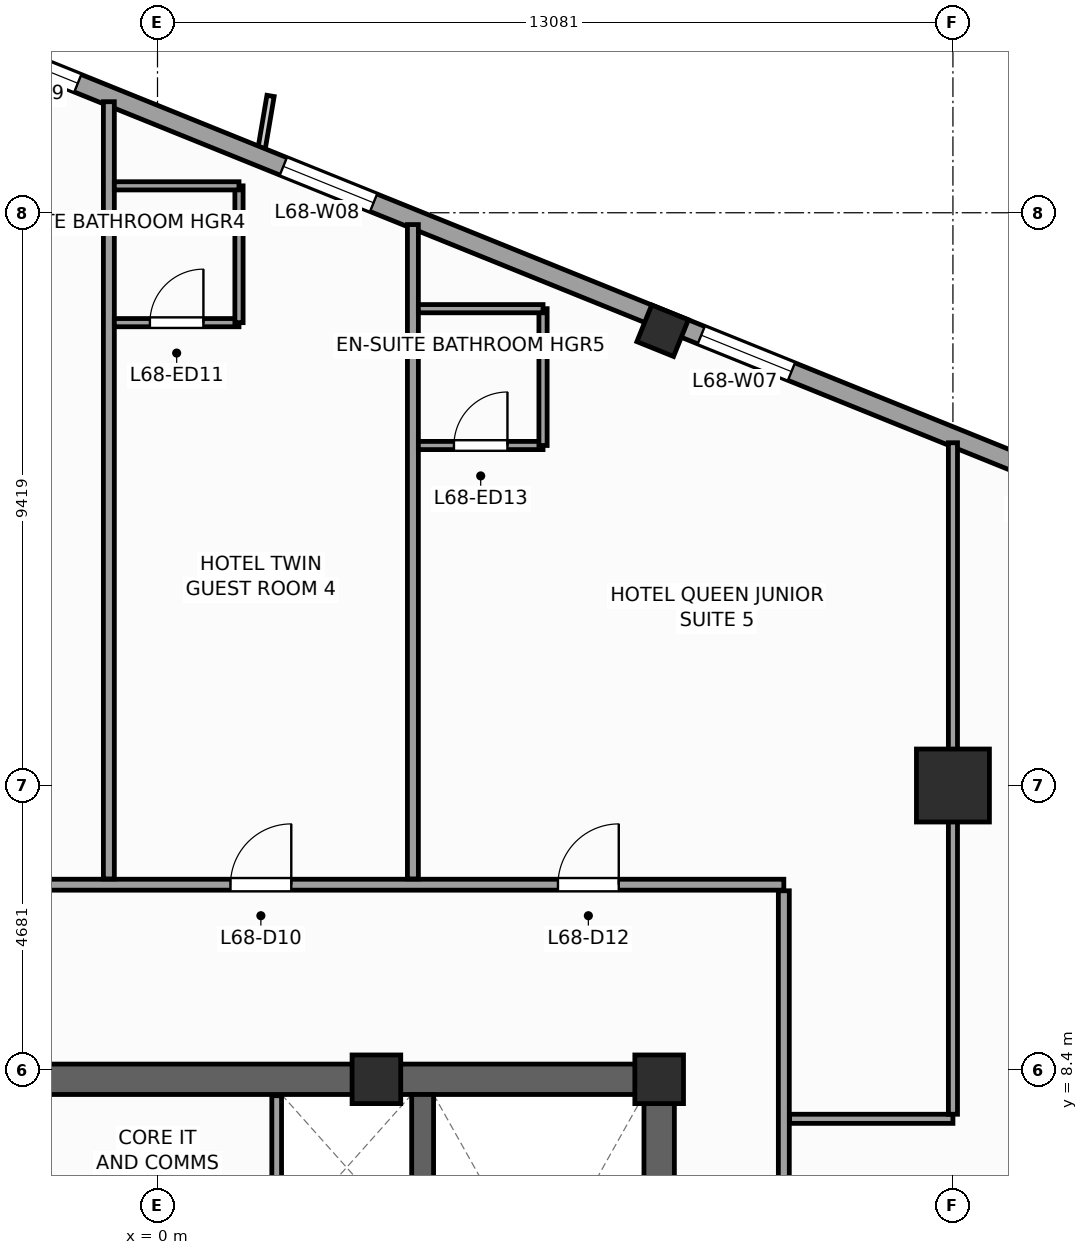
"""IFC4 building model, lengths in metres.
Left out: names, types, materials, properties, quantities, classifications, styles, units other than length and angle.
Written with IfcOpenShell. Run it as: python <this file> out.ifc"""

import sys

from ifc_helpers import new_model, si_unit, direction, frame, frame_2d, origin, origin_2d, place, context, subcontext, project, spatial, rectangle, extrude, source, transform, mapped, element, fill, save


model = new_model("IFC4")
c1 = context("Model", 3, precision=1e-05, world=origin(), true_north=direction((0.0, 1.0)))
c2 = subcontext(c1, "Body", "Model", "MODEL_VIEW")
j1 = project(units=[si_unit("LENGTHUNIT", "METRE"), si_unit("PLANEANGLEUNIT", "RADIAN")], contexts=[c1])
p1 = place(None, origin())
s1 = spatial("IfcSite", under=j1, at=p1, CompositionType="ELEMENT")
p2 = place(p1, origin())
s2 = spatial("IfcBuilding", under=s1, at=p2, CompositionType="ELEMENT")
p3 = place(p2, frame((0.0, 0.0, 279.6)))
s3 = spatial("IfcBuildingStorey", under=s2, at=p3, CompositionType="ELEMENT", Elevation=279.6)
p4 = place(p3, frame((-8.5, 8.25, 0.0), z_axis=(0.0, 0.0, 1.0), x_axis=(1.0, 0.0, 0.0)))
e1 = element("IfcWall", 1, at=p4, inside=s3, PredefinedType="SHEAR", context=c2, shape_type="SweptSolid", body=[
    extrude(rectangle(XDim=17.0, YDim=0.5, at=frame_2d((8.5, 0.0))), origin(), (0.0, 0.0, 1.0), 3.6),
])
p5 = place(p3, frame((8.25, -8.0, 0.0), z_axis=(0.0, 0.0, 1.0), x_axis=(0.0, 1.0, 0.0)))
e2 = element("IfcWall", 2, at=p5, inside=s3, PredefinedType="SHEAR", context=c2, shape_type="SweptSolid", body=[
    extrude(rectangle(XDim=16.0, YDim=0.5, at=frame_2d((8.0, 0.0))), origin(), (0.0, 0.0, 1.0), 3.6),
])
p6 = place(p5, frame((4.69, 0.0, 0.0)))
e3 = element("IfcOpeningElement", 3, at=p6, cuts=e2, PredefinedType="OPENING", context=c2, shape_type="SweptSolid", body=[
    extrude(rectangle(XDim=1.3, YDim=2.2, at=frame_2d((0.65, 1.1))), frame((0.0, 0.26, 0.0), z_axis=(0.0, -1.0, 0.0), x_axis=(1.0, 0.0, 0.0)), (0.0, 0.0, 1.0), 0.52),
])
p7 = place(p3, frame((4.36, -8.0, 0.0), z_axis=(0.0, 0.0, 1.0), x_axis=(0.0, 1.0, 0.0)))
e4 = element("IfcWall", 4, at=p7, inside=s3, PredefinedType="SHEAR", context=c2, shape_type="SweptSolid", body=[
    extrude(rectangle(XDim=16.0, YDim=0.36, at=frame_2d((8.0, 0.0))), origin(), (0.0, 0.0, 1.0), 3.6),
])
m1 = source(origin(), c2, "Body", "SweptSolid", [
    extrude(rectangle(XDim=0.8, YDim=0.8, at=origin_2d()), origin(), (0.0, 0.0, 1.0), 3.6),
])
for number, where, z_axis, x_axis in (
    (5, (8.25, 8.25, 0.0), (0.0, 0.0, 1.0), (1.0, 0.0, 0.0)),
    (6, (3.6, 8.25, 0.0), (0.0, 0.0, 1.0), (1.0, 0.0, 0.0)),
):
    element("IfcColumn", number, at=place(p3, frame(where, z_axis=z_axis, x_axis=x_axis)), inside=s3, PredefinedType="PILASTER", context=c2, shape_type="MappedRepresentation", body=[
        mapped(m1, transform((0.0, 0.0, 0.0), scale=1.0)),
    ])
m2 = source(origin(), c2, "Body", "SweptSolid", [
    extrude(rectangle(XDim=1.2, YDim=1.2, at=origin_2d()), origin(), (0.0, 0.0, 1.0), 3.6),
])
p8 = place(p3, frame((13.081, 13.081, 0.0), z_axis=(0.0, 0.0, 1.0), x_axis=(1.0, 0.0, 0.0)))
e7 = element("IfcColumn", 7, at=p8, inside=s3, PredefinedType="COLUMN", context=c2, shape_type="MappedRepresentation", body=[
    mapped(m2, transform((0.0, 0.0, 0.0), scale=1.0)),
])
m3 = source(origin(), c2, "Body", "SweptSolid", [
    extrude(rectangle(XDim=0.65, YDim=0.65, at=origin_2d()), origin(), (0.0, 0.0, 1.0), 3.6),
])
p9 = place(p3, frame((8.307, 20.56, 0.0), z_axis=(0.0, 0.0, 1.0), x_axis=(0.374606593416, 0.927183854567, 0.0)))
e8 = element("IfcColumn", 8, at=p9, inside=s3, PredefinedType="COLUMN", context=c2, shape_type="MappedRepresentation", body=[
    mapped(m3, transform((0.0, 0.0, 0.0), scale=1.0)),
])
p10 = place(p3, frame((23.813, 14.479, 0.0), z_axis=(0.0, 0.0, 1.0), x_axis=(-0.927182657188, 0.374609557019, 0.0)))
e9 = element("IfcWall", 9, at=p10, inside=s3, PredefinedType="STANDARD", context=c2, shape_type="SweptSolid", body=[
    extrude(rectangle(XDim=33.31, YDim=0.31, at=frame_2d((16.655, 0.0))), origin(), (0.0, 0.0, 1.0), 2.75),
])
p11 = place(p10, frame((3.197, 0.0, 0.47)))
e10 = element("IfcOpeningElement", 10, at=p11, cuts=e9, PredefinedType="OPENING", context=c2, shape_type="SweptSolid", body=[
    extrude(rectangle(XDim=1.6, YDim=2.1, at=frame_2d((0.8, 1.05))), frame((0.0, 0.165, 0.0), z_axis=(0.0, -1.0, 0.0), x_axis=(1.0, 0.0, 0.0)), (0.0, 0.0, 1.0), 0.33),
])
p12 = place(p10, frame((8.86, 0.0, 0.47)))
e11 = element("IfcOpeningElement", 11, at=p12, cuts=e9, PredefinedType="OPENING", context=c2, shape_type="SweptSolid", body=[
    extrude(rectangle(XDim=1.6, YDim=2.1, at=frame_2d((0.8, 1.05))), frame((0.0, 0.165, 0.0), z_axis=(0.0, -1.0, 0.0), x_axis=(1.0, 0.0, 0.0)), (0.0, 0.0, 1.0), 0.33),
])
p13 = place(p10, frame((14.439, 0.0, 0.47)))
e12 = element("IfcOpeningElement", 12, at=p13, cuts=e9, PredefinedType="OPENING", context=c2, shape_type="SweptSolid", body=[
    extrude(rectangle(XDim=1.6, YDim=2.1, at=frame_2d((0.8, 1.05))), frame((0.0, 0.165, 0.0), z_axis=(0.0, -1.0, 0.0), x_axis=(1.0, 0.0, 0.0)), (0.0, 0.0, 1.0), 0.33),
])
p14 = place(p10, frame((21.851, 0.0, 0.47)))
e13 = element("IfcOpeningElement", 13, at=p14, cuts=e9, PredefinedType="OPENING", context=c2, shape_type="SweptSolid", body=[
    extrude(rectangle(XDim=1.6, YDim=2.1, at=frame_2d((0.8, 1.05))), frame((0.0, 0.165, 0.0), z_axis=(0.0, -1.0, 0.0), x_axis=(1.0, 0.0, 0.0)), (0.0, 0.0, 1.0), 0.33),
])
p15 = place(p10, frame((27.097, 0.0, 0.47)))
e14 = element("IfcOpeningElement", 14, at=p15, cuts=e9, PredefinedType="OPENING", context=c2, shape_type="SweptSolid", body=[
    extrude(rectangle(XDim=1.6, YDim=2.1, at=frame_2d((0.8, 1.05))), frame((0.0, 0.165, 0.0), z_axis=(0.0, -1.0, 0.0), x_axis=(1.0, 0.0, 0.0)), (0.0, 0.0, 1.0), 0.33),
])
p16 = place(p3, frame((1.96, 4.58, 0.0), z_axis=(0.0, 0.0, 1.0), x_axis=(0.0, 1.0, 0.0)))
e15 = element("IfcWall", 15, at=p16, inside=s3, PredefinedType="PARTITIONING", context=c2, shape_type="SweptSolid", body=[
    extrude(rectangle(XDim=3.4, YDim=0.16, at=frame_2d((1.7, 0.0))), origin(), (0.0, 0.0, 1.0), 3.35),
])
p17 = place(p3, frame((-11.45, 11.45, 0.0), z_axis=(0.0, 0.0, 1.0), x_axis=(1.0, 0.0, 0.0)))
e16 = element("IfcWall", 16, at=p17, inside=s3, PredefinedType="PARTITIONING", context=c2, shape_type="SweptSolid", body=[
    extrude(rectangle(XDim=21.75, YDim=0.18, at=frame_2d((10.875, 0.0))), origin(), (0.0, 0.0, 1.0), 3.35),
])
p18 = place(p17, frame((2.639, 0.0, 0.0)))
e17 = element("IfcOpeningElement", 17, at=p18, cuts=e16, PredefinedType="OPENING", context=c2, shape_type="SweptSolid", body=[
    extrude(rectangle(XDim=1.0, YDim=2.15, at=frame_2d((0.5, 1.075))), frame((0.0, 0.1, 0.0), z_axis=(0.0, -1.0, 0.0), x_axis=(1.0, 0.0, 0.0)), (0.0, 0.0, 1.0), 0.2),
])
p19 = place(p17, frame((7.8, 0.0, 0.0)))
e18 = element("IfcOpeningElement", 18, at=p19, cuts=e16, PredefinedType="OPENING", context=c2, shape_type="SweptSolid", body=[
    extrude(rectangle(XDim=1.0, YDim=2.15, at=frame_2d((0.5, 1.075))), frame((0.0, 0.1, 0.0), z_axis=(0.0, -1.0, 0.0), x_axis=(1.0, 0.0, 0.0)), (0.0, 0.0, 1.0), 0.2),
])
p20 = place(p17, frame((12.65, 0.0, 0.0)))
e19 = element("IfcOpeningElement", 19, at=p20, cuts=e16, PredefinedType="OPENING", context=c2, shape_type="SweptSolid", body=[
    extrude(rectangle(XDim=1.0, YDim=2.15, at=frame_2d((0.5, 1.075))), frame((0.0, 0.1, 0.0), z_axis=(0.0, -1.0, 0.0), x_axis=(1.0, 0.0, 0.0)), (0.0, 0.0, 1.0), 0.2),
])
p21 = place(p17, frame((18.036, 0.0, 0.0)))
e20 = element("IfcOpeningElement", 20, at=p21, cuts=e16, PredefinedType="OPENING", context=c2, shape_type="SweptSolid", body=[
    extrude(rectangle(XDim=1.0, YDim=2.15, at=frame_2d((0.5, 1.075))), frame((0.0, 0.1, 0.0), z_axis=(0.0, -1.0, 0.0), x_axis=(1.0, 0.0, 0.0)), (0.0, 0.0, 1.0), 0.2),
])
p22 = place(p3, frame((10.3, -12.35, 0.0), z_axis=(0.0, 0.0, 1.0), x_axis=(0.0, 1.0, 0.0)))
e21 = element("IfcWall", 21, at=p22, inside=s3, PredefinedType="PARTITIONING", context=c2, shape_type="SweptSolid", body=[
    extrude(rectangle(XDim=23.7, YDim=0.18, at=frame_2d((11.85, 0.0))), origin(), (0.0, 0.0, 1.0), 3.35),
])
p23 = place(p22, frame((17.65, 0.0, 0.0)))
e22 = element("IfcOpeningElement", 22, at=p23, cuts=e21, PredefinedType="OPENING", context=c2, shape_type="SweptSolid", body=[
    extrude(rectangle(XDim=1.0, YDim=2.15, at=frame_2d((0.5, 1.075))), frame((0.0, 0.1, 0.0), z_axis=(0.0, -1.0, 0.0), x_axis=(1.0, 0.0, 0.0)), (0.0, 0.0, 1.0), 0.2),
])
p24 = place(p22, frame((13.85, 0.0, 0.0)))
e23 = element("IfcOpeningElement", 23, at=p24, cuts=e21, PredefinedType="OPENING", context=c2, shape_type="SweptSolid", body=[
    extrude(rectangle(XDim=1.0, YDim=2.15, at=frame_2d((0.5, 1.075))), frame((0.0, 0.1, 0.0), z_axis=(0.0, -1.0, 0.0), x_axis=(1.0, 0.0, 0.0)), (0.0, 0.0, 1.0), 0.2),
])
p25 = place(p22, frame((9.85, 0.0, 0.0)))
e24 = element("IfcOpeningElement", 24, at=p25, cuts=e21, PredefinedType="OPENING", context=c2, shape_type="SweptSolid", body=[
    extrude(rectangle(XDim=1.0, YDim=2.15, at=frame_2d((0.5, 1.075))), frame((0.0, 0.1, 0.0), z_axis=(0.0, -1.0, 0.0), x_axis=(1.0, 0.0, 0.0)), (0.0, 0.0, 1.0), 0.2),
])
p26 = place(p22, frame((6.05, 0.0, 0.0)))
e25 = element("IfcOpeningElement", 25, at=p26, cuts=e21, PredefinedType="OPENING", context=c2, shape_type="SweptSolid", body=[
    extrude(rectangle(XDim=1.0, YDim=2.15, at=frame_2d((0.5, 1.075))), frame((0.0, 0.1, 0.0), z_axis=(0.0, -1.0, 0.0), x_axis=(1.0, 0.0, 0.0)), (0.0, 0.0, 1.0), 0.2),
])
p27 = place(p3, frame((-0.8, 11.545, 0.0), z_axis=(0.0, 0.0, 1.0), x_axis=(0.0, 1.0, 0.0)))
e26 = element("IfcWall", 26, at=p27, inside=s3, PredefinedType="PARTITIONING", context=c2, shape_type="SweptSolid", body=[
    extrude(rectangle(XDim=12.781, YDim=0.18, at=frame_2d((6.391, 0.0))), origin(), (0.0, 0.0, 1.0), 3.35),
])
p28 = place(p3, frame((4.2, 11.545, 0.0), z_axis=(0.0, 0.0, 1.0), x_axis=(0.0, 1.0, 0.0)))
e27 = element("IfcWall", 27, at=p28, inside=s3, PredefinedType="PARTITIONING", context=c2, shape_type="SweptSolid", body=[
    extrude(rectangle(XDim=10.761, YDim=0.18, at=frame_2d((5.38, 0.0))), origin(), (0.0, 0.0, 1.0), 3.35),
])
p29 = place(p3, frame((10.395, 7.6, 0.0), z_axis=(0.0, 0.0, 1.0), x_axis=(1.0, 0.0, 0.0)))
e28 = element("IfcWall", 28, at=p29, inside=s3, PredefinedType="PARTITIONING", context=c2, shape_type="SweptSolid", body=[
    extrude(rectangle(XDim=2.686, YDim=0.15, at=frame_2d((1.343, 0.0))), origin(), (0.0, 0.0, 1.0), 3.35),
])
p30 = place(p3, frame((13.081, 7.675, 0.0), z_axis=(0.0, 0.0, 1.0), x_axis=(0.0, 1.0, 0.0)))
e29 = element("IfcWall", 29, at=p30, inside=s3, PredefinedType="PARTITIONING", context=c2, shape_type="SweptSolid", body=[
    extrude(rectangle(XDim=11.043, YDim=0.15, at=frame_2d((5.521, 0.0))), origin(), (0.0, 0.0, 1.0), 2.45),
])
p31 = place(p3, frame((-0.71, 20.693, 0.0), z_axis=(0.0, 0.0, 1.0), x_axis=(1.0, 0.0, 0.0)))
e30 = element("IfcWall", 30, at=p31, inside=s3, PredefinedType="PARTITIONING", context=c2, shape_type="SweptSolid", body=[
    extrude(rectangle(XDim=2.05, YDim=0.135, at=frame_2d((1.025, 0.0))), origin(), (0.0, 0.0, 1.0), 3.35),
])
p32 = place(p31, frame((0.585, 0.0, 0.0)))
e31 = element("IfcOpeningElement", 31, at=p32, cuts=e30, PredefinedType="OPENING", context=c2, shape_type="SweptSolid", body=[
    extrude(rectangle(XDim=0.88, YDim=2.1, at=frame_2d((0.44, 1.05))), frame((0.0, 0.078, 0.0), z_axis=(0.0, -1.0, 0.0), x_axis=(1.0, 0.0, 0.0)), (0.0, 0.0, 1.0), 0.155),
])
p33 = place(p3, frame((1.34, 20.693, 0.0), z_axis=(0.0, 0.0, 1.0), x_axis=(0.0, 1.0, 0.0)))
e32 = element("IfcWall", 32, at=p33, inside=s3, PredefinedType="PARTITIONING", context=c2, shape_type="SweptSolid", body=[
    extrude(rectangle(XDim=2.25, YDim=0.135, at=frame_2d((1.125, 0.0))), origin(), (0.0, 0.0, 1.0), 3.35),
])
p34 = place(p3, frame((-0.71, 22.943, 0.0), z_axis=(0.0, 0.0, 1.0), x_axis=(1.0, 0.0, 0.0)))
e33 = element("IfcWall", 33, at=p34, inside=s3, PredefinedType="PARTITIONING", context=c2, shape_type="SweptSolid", body=[
    extrude(rectangle(XDim=2.05, YDim=0.135, at=frame_2d((1.025, 0.0))), origin(), (0.0, 0.0, 1.0), 3.35),
])
p35 = place(p3, frame((4.29, 18.673, 0.0), z_axis=(0.0, 0.0, 1.0), x_axis=(1.0, 0.0, 0.0)))
e34 = element("IfcWall", 34, at=p35, inside=s3, PredefinedType="PARTITIONING", context=c2, shape_type="SweptSolid", body=[
    extrude(rectangle(XDim=2.05, YDim=0.135, at=frame_2d((1.025, 0.0))), origin(), (0.0, 0.0, 1.0), 2.95),
])
p36 = place(p35, frame((0.585, 0.0, 0.0)))
e35 = element("IfcOpeningElement", 35, at=p36, cuts=e34, PredefinedType="OPENING", context=c2, shape_type="SweptSolid", body=[
    extrude(rectangle(XDim=0.88, YDim=2.1, at=frame_2d((0.44, 1.05))), frame((0.0, 0.078, 0.0), z_axis=(0.0, -1.0, 0.0), x_axis=(1.0, 0.0, 0.0)), (0.0, 0.0, 1.0), 0.155),
])
p37 = place(p3, frame((6.34, 18.673, 0.0), z_axis=(0.0, 0.0, 1.0), x_axis=(0.0, 1.0, 0.0)))
e36 = element("IfcWall", 36, at=p37, inside=s3, PredefinedType="PARTITIONING", context=c2, shape_type="SweptSolid", body=[
    extrude(rectangle(XDim=2.25, YDim=0.135, at=frame_2d((1.125, 0.0))), origin(), (0.0, 0.0, 1.0), 3.35),
])
p38 = place(p3, frame((4.29, 20.923, 0.0), z_axis=(0.0, 0.0, 1.0), x_axis=(1.0, 0.0, 0.0)))
e37 = element("IfcWall", 37, at=p38, inside=s3, PredefinedType="PARTITIONING", context=c2, shape_type="SweptSolid", body=[
    extrude(rectangle(XDim=2.05, YDim=0.135, at=frame_2d((1.025, 0.0))), origin(), (0.0, 0.0, 1.0), 3.35),
])
m4 = source(origin(), c2, "Body", "SweptSolid", [
    extrude(rectangle(XDim=1.6, YDim=2.1, at=frame_2d((0.8, 1.05))), frame((0.0, 0.03, 0.0), z_axis=(0.0, -1.0, 0.0), x_axis=(1.0, 0.0, 0.0)), (0.0, 0.0, 1.0), 0.06),
])
p39 = place(p13, origin())
e38 = element("IfcWindow", 38, at=p39, inside=s3, PartitioningType="SINGLE_PANEL", PredefinedType="WINDOW", context=c2, shape_type="MappedRepresentation", body=[
    mapped(m4, transform((0.0, 0.0, 0.0), scale=1.0)),
])
fill(e12, e38)
p40 = place(p14, origin())
e39 = element("IfcWindow", 39, at=p40, inside=s3, PartitioningType="SINGLE_PANEL", PredefinedType="WINDOW", context=c2, shape_type="MappedRepresentation", body=[
    mapped(m4, transform((0.0, 0.0, 0.0), scale=1.0)),
])
fill(e13, e39)
p41 = place(p15, origin())
e40 = element("IfcWindow", 40, at=p41, inside=s3, PartitioningType="SINGLE_PANEL", PredefinedType="WINDOW", context=c2, shape_type="MappedRepresentation", body=[
    mapped(m4, transform((0.0, 0.0, 0.0), scale=1.0)),
])
fill(e14, e40)
m5 = source(origin(), c2, "Body", "SweptSolid", [
    extrude(rectangle(XDim=1.0, YDim=2.15, at=frame_2d((0.5, 1.075))), frame((0.0, 0.025, 0.0), z_axis=(0.0, -1.0, 0.0), x_axis=(1.0, 0.0, 0.0)), (0.0, 0.0, 1.0), 0.05),
])
p42 = place(p20, origin())
e41 = element("IfcDoor", 41, at=p42, inside=s3, OperationType="SINGLE_SWING_RIGHT", PredefinedType="DOOR", context=c2, shape_type="MappedRepresentation", body=[
    mapped(m5, transform((0.0, 0.0, 0.0), scale=1.0)),
])
fill(e19, e41)
m6 = source(origin(), c2, "Body", "SweptSolid", [
    extrude(rectangle(XDim=0.88, YDim=2.1, at=frame_2d((0.44, 1.05))), frame((0.0, 0.025, 0.0), z_axis=(0.0, -1.0, 0.0), x_axis=(1.0, 0.0, 0.0)), (0.0, 0.0, 1.0), 0.05),
])
p43 = place(p32, origin())
e42 = element("IfcDoor", 42, at=p43, inside=s3, OperationType="SINGLE_SWING_RIGHT", PredefinedType="DOOR", context=c2, shape_type="MappedRepresentation", body=[
    mapped(m6, transform((0.0, 0.0, 0.0), scale=1.0)),
])
fill(e31, e42)
p44 = place(p21, origin())
e43 = element("IfcDoor", 43, at=p44, inside=s3, OperationType="SINGLE_SWING_RIGHT", PredefinedType="DOOR", context=c2, shape_type="MappedRepresentation", body=[
    mapped(m5, transform((0.0, 0.0, 0.0), scale=1.0)),
])
fill(e20, e43)
p45 = place(p36, origin())
e44 = element("IfcDoor", 44, at=p45, inside=s3, OperationType="SINGLE_SWING_RIGHT", PredefinedType="DOOR", context=c2, shape_type="MappedRepresentation", body=[
    mapped(m6, transform((0.0, 0.0, 0.0), scale=1.0)),
])
fill(e35, e44)
save(model, sys.argv[1])
